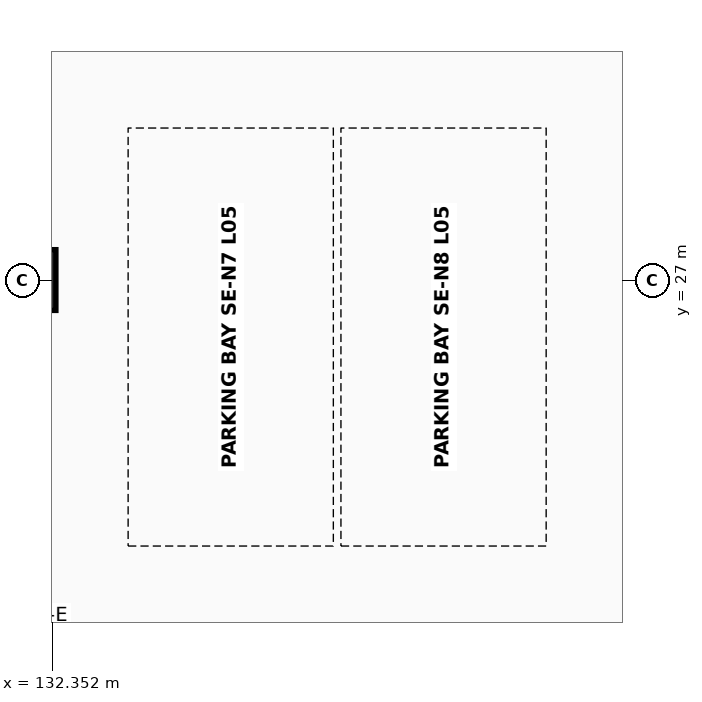
"""IFC4 building model, lengths in metres.
Left out: names, types, materials, properties, quantities, classifications, styles, units other than length and angle.
Written with IfcOpenShell. Run it as: python <this file> out.ifc"""

import sys

from ifc_helpers import new_model, si_unit, direction, frame, origin, origin_2d, place, context, subcontext, project, spatial, rectangle, extrude, element, save


model = new_model("IFC4")
c1 = context("Model", 3, precision=1e-05, world=origin(), true_north=direction((0.0, 1.0)))
c2 = subcontext(c1, "Body", "Model", "MODEL_VIEW")
j1 = project(units=[si_unit("LENGTHUNIT", "METRE"), si_unit("PLANEANGLEUNIT", "RADIAN")], contexts=[c1])
p1 = place(None, origin())
s1 = spatial("IfcSite", under=j1, at=p1, CompositionType="ELEMENT")
p2 = place(p1, origin())
s2 = spatial("IfcBuilding", under=s1, at=p2, CompositionType="ELEMENT")
p3 = place(p2, frame((0.0, 0.0, 21.0)))
s3 = spatial("IfcBuildingStorey", under=s2, at=p3, CompositionType="ELEMENT", Elevation=21.0)
p4 = place(p3, frame((132.0, 27.0, 0.0), z_axis=(0.0, 0.0, 1.0), x_axis=(1.0, 0.0, 0.0)))
e1 = element("IfcColumn", 1, at=p4, inside=s3, PredefinedType="COLUMN", context=c2, shape_type="SweptSolid", body=[
    extrude(rectangle(XDim=0.8, YDim=0.8, at=origin_2d()), origin(), (0.0, 0.0, 1.0), 3.8),
])
save(model, sys.argv[1])
